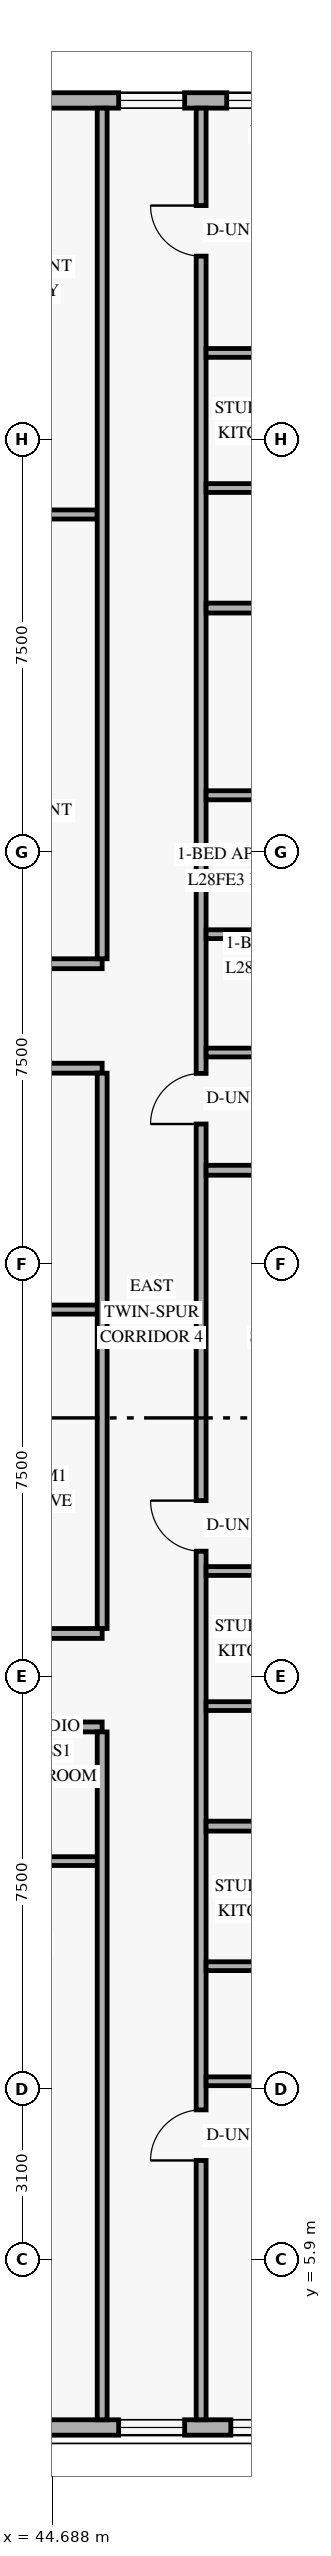
"""IFC4 building model, lengths in metres.
Left out: names, types, materials, properties, quantities, classifications, styles, units other than length and angle.
Written with IfcOpenShell. Run it as: python <this file> out.ifc"""

import sys

from ifc_helpers import new_model, si_unit, direction, frame, frame_2d, origin, place, context, subcontext, project, spatial, rectangle, extrude, element, fill, save


model = new_model("IFC4")
c1 = context("Model", 3, precision=1e-05, world=origin(), true_north=direction((0.0, 1.0)))
c2 = subcontext(c1, "Body", "Model", "MODEL_VIEW")
j1 = project(units=[si_unit("LENGTHUNIT", "METRE"), si_unit("PLANEANGLEUNIT", "RADIAN")], contexts=[c1])
p1 = place(None, origin())
s1 = spatial("IfcSite", under=j1, at=p1, CompositionType="ELEMENT")
p2 = place(p1, origin())
s2 = spatial("IfcBuilding", under=s1, at=p2, CompositionType="ELEMENT")
p3 = place(p2, frame((0.0, 0.0, 109.8)))
s3 = spatial("IfcBuildingStorey", under=s2, at=p3, CompositionType="ELEMENT", Elevation=109.8)
p4 = place(p3, frame((34.4, 2.84, 0.0), z_axis=(0.0, 0.0, 1.0), x_axis=(1.0, 0.0, 0.0)))
e1 = element("IfcWall", 1, at=p4, inside=s3, PredefinedType="SOLIDWALL", context=c2, shape_type="SweptSolid", body=[
    extrude(rectangle(XDim=15.58, YDim=0.28, at=frame_2d((7.79, 0.0))), origin(), (0.0, 0.0, 1.0), 3.36),
])
p5 = place(p4, frame((1.535, 0.0, 0.85)))
e2 = element("IfcOpeningElement", 2, at=p5, cuts=e1, PredefinedType="OPENING", context=c2, shape_type="SweptSolid", body=[
    extrude(rectangle(XDim=1.5, YDim=1.55, at=frame_2d((0.75, 0.775))), frame((0.0, 0.15, 0.0), z_axis=(0.0, -1.0, 0.0), x_axis=(1.0, 0.0, 0.0)), (0.0, 0.0, 1.0), 0.3),
])
p6 = place(p4, frame((6.625, 0.0, 0.85)))
e3 = element("IfcOpeningElement", 3, at=p6, cuts=e1, PredefinedType="OPENING", context=c2, shape_type="SweptSolid", body=[
    extrude(rectangle(XDim=1.5, YDim=1.55, at=frame_2d((0.75, 0.775))), frame((0.0, 0.15, 0.0), z_axis=(0.0, -1.0, 0.0), x_axis=(1.0, 0.0, 0.0)), (0.0, 0.0, 1.0), 0.3),
])
p7 = place(p4, frame((11.5, 0.0, 0.85)))
e4 = element("IfcOpeningElement", 4, at=p7, cuts=e1, PredefinedType="OPENING", context=c2, shape_type="SweptSolid", body=[
    extrude(rectangle(XDim=1.2, YDim=1.5, at=frame_2d((0.6, 0.75))), frame((0.0, 0.15, 0.0), z_axis=(0.0, -1.0, 0.0), x_axis=(1.0, 0.0, 0.0)), (0.0, 0.0, 1.0), 0.3),
])
p8 = place(p4, frame((13.54, 0.0, 0.85)))
e5 = element("IfcOpeningElement", 5, at=p8, cuts=e1, PredefinedType="OPENING", context=c2, shape_type="SweptSolid", body=[
    extrude(rectangle(XDim=1.5, YDim=1.55, at=frame_2d((0.75, 0.775))), frame((0.0, 0.15, 0.0), z_axis=(0.0, -1.0, 0.0), x_axis=(1.0, 0.0, 0.0)), (0.0, 0.0, 1.0), 0.3),
])
p9 = place(p3, frame((49.98, 45.16, 0.0), z_axis=(0.0, 0.0, 1.0), x_axis=(-1.0, 0.0, 0.0)))
e6 = element("IfcWall", 6, at=p9, inside=s3, PredefinedType="SOLIDWALL", context=c2, shape_type="SweptSolid", body=[
    extrude(rectangle(XDim=36.56, YDim=0.28, at=frame_2d((18.28, 0.0))), origin(), (0.0, 0.0, 1.0), 3.36),
])
p10 = place(p9, frame((30.99, 0.0, 0.85)))
e7 = element("IfcOpeningElement", 7, at=p10, cuts=e6, PredefinedType="OPENING", context=c2, shape_type="SweptSolid", body=[
    extrude(rectangle(XDim=1.65, YDim=1.6, at=frame_2d((0.825, 0.8))), frame((0.0, 0.15, 0.0), z_axis=(0.0, -1.0, 0.0), x_axis=(1.0, 0.0, 0.0)), (0.0, 0.0, 1.0), 0.3),
])
p11 = place(p9, frame((23.13, 0.0, 0.85)))
e8 = element("IfcOpeningElement", 8, at=p11, cuts=e6, PredefinedType="OPENING", context=c2, shape_type="SweptSolid", body=[
    extrude(rectangle(XDim=1.65, YDim=1.6, at=frame_2d((0.825, 0.8))), frame((0.0, 0.15, 0.0), z_axis=(0.0, -1.0, 0.0), x_axis=(1.0, 0.0, 0.0)), (0.0, 0.0, 1.0), 0.3),
])
p12 = place(p9, frame((16.245, 0.0, 0.85)))
e9 = element("IfcOpeningElement", 9, at=p12, cuts=e6, PredefinedType="OPENING", context=c2, shape_type="SweptSolid", body=[
    extrude(rectangle(XDim=1.65, YDim=1.6, at=frame_2d((0.825, 0.8))), frame((0.0, 0.15, 0.0), z_axis=(0.0, -1.0, 0.0), x_axis=(1.0, 0.0, 0.0)), (0.0, 0.0, 1.0), 0.3),
])
p13 = place(p9, frame((10.64, 0.0, 0.85)))
e10 = element("IfcOpeningElement", 10, at=p13, cuts=e6, PredefinedType="OPENING", context=c2, shape_type="SweptSolid", body=[
    extrude(rectangle(XDim=1.65, YDim=1.6, at=frame_2d((0.825, 0.8))), frame((0.0, 0.15, 0.0), z_axis=(0.0, -1.0, 0.0), x_axis=(1.0, 0.0, 0.0)), (0.0, 0.0, 1.0), 0.3),
])
p14 = place(p9, frame((5.55, 0.0, 0.85)))
e11 = element("IfcOpeningElement", 11, at=p14, cuts=e6, PredefinedType="OPENING", context=c2, shape_type="SweptSolid", body=[
    extrude(rectangle(XDim=1.65, YDim=1.6, at=frame_2d((0.825, 0.8))), frame((0.0, 0.15, 0.0), z_axis=(0.0, -1.0, 0.0), x_axis=(1.0, 0.0, 0.0)), (0.0, 0.0, 1.0), 0.3),
])
p15 = place(p9, frame((2.88, 0.0, 0.85)))
e12 = element("IfcOpeningElement", 12, at=p15, cuts=e6, PredefinedType="OPENING", context=c2, shape_type="SweptSolid", body=[
    extrude(rectangle(XDim=1.2, YDim=1.5, at=frame_2d((0.6, 0.75))), frame((0.0, 0.15, 0.0), z_axis=(0.0, -1.0, 0.0), x_axis=(1.0, 0.0, 0.0)), (0.0, 0.0, 1.0), 0.3),
])
p16 = place(p9, frame((0.465, 0.0, 0.85)))
e13 = element("IfcOpeningElement", 13, at=p16, cuts=e6, PredefinedType="OPENING", context=c2, shape_type="SweptSolid", body=[
    extrude(rectangle(XDim=1.65, YDim=1.6, at=frame_2d((0.825, 0.8))), frame((0.0, 0.15, 0.0), z_axis=(0.0, -1.0, 0.0), x_axis=(1.0, 0.0, 0.0)), (0.0, 0.0, 1.0), 0.3),
])
p17 = place(p3, frame((38.032, 15.58, 0.0), z_axis=(0.0, 0.0, 1.0), x_axis=(1.0, 0.0, 0.0)))
e14 = element("IfcWall", 14, at=p17, inside=s3, PredefinedType="STANDARD", context=c2, shape_type="SweptSolid", body=[
    extrude(rectangle(XDim=7.568, YDim=0.18, at=frame_2d((3.784, 0.0))), origin(), (0.0, 0.0, 1.0), 2.731),
])
p18 = place(p17, frame((0.357, 0.0, 0.0)))
e15 = element("IfcOpeningElement", 15, at=p18, cuts=e14, PredefinedType="OPENING", context=c2, shape_type="SweptSolid", body=[
    extrude(rectangle(XDim=0.92, YDim=2.15, at=frame_2d((0.46, 1.075))), frame((0.0, 0.1, 0.0), z_axis=(0.0, -1.0, 0.0), x_axis=(1.0, 0.0, 0.0)), (0.0, 0.0, 1.0), 0.2),
])
for number, where, z_axis, x_axis in (
    (16, (37.64, 17.28, 0.0), (0.0, 0.0, 1.0), (1.0, 0.0, 0.0)),
    (17, (37.64, 27.56, 0.0), (0.0, 0.0, 1.0), (1.0, 0.0, 0.0)),
):
    element("IfcWall", number, at=place(p3, frame(where, z_axis=z_axis, x_axis=x_axis)), inside=s3, PredefinedType="STANDARD", context=c2, shape_type="SweptSolid", body=[
        extrude(rectangle(XDim=7.96, YDim=0.18, at=frame_2d((3.98, 0.0))), origin(), (0.0, 0.0, 1.0), 2.731),
    ])
p19 = place(p3, frame((35.51, 29.46, 0.0), z_axis=(0.0, 0.0, 1.0), x_axis=(1.0, 0.0, 0.0)))
e18 = element("IfcWall", 18, at=p19, inside=s3, PredefinedType="STANDARD", context=c2, shape_type="SweptSolid", body=[
    extrude(rectangle(XDim=10.09, YDim=0.18, at=frame_2d((5.045, 0.0))), origin(), (0.0, 0.0, 1.0), 2.731),
])
p20 = place(p19, frame((0.32, 0.0, 0.0)))
e19 = element("IfcOpeningElement", 19, at=p20, cuts=e18, PredefinedType="OPENING", context=c2, shape_type="SweptSolid", body=[
    extrude(rectangle(XDim=0.92, YDim=2.15, at=frame_2d((0.46, 1.075))), frame((0.0, 0.1, 0.0), z_axis=(0.0, -1.0, 0.0), x_axis=(1.0, 0.0, 0.0)), (0.0, 0.0, 1.0), 0.2),
])
p21 = place(p3, frame((40.93, 13.14, 0.0), z_axis=(0.0, 0.0, 1.0), x_axis=(1.0, 0.0, 0.0)))
e20 = element("IfcWall", 20, at=p21, inside=s3, PredefinedType="PLUMBINGWALL", context=c2, shape_type="SweptSolid", body=[
    extrude(rectangle(XDim=4.67, YDim=0.16, at=frame_2d((2.335, 0.0))), origin(), (0.0, 0.0, 1.0), 2.731),
])
p22 = place(p21, frame((0.35, 0.0, 0.0)))
e21 = element("IfcOpeningElement", 21, at=p22, cuts=e20, PredefinedType="OPENING", context=c2, shape_type="SweptSolid", body=[
    extrude(rectangle(XDim=0.88, YDim=2.12, at=frame_2d((0.44, 1.06))), frame((0.0, 0.09, 0.0), z_axis=(0.0, -1.0, 0.0), x_axis=(1.0, 0.0, 0.0)), (0.0, 0.0, 1.0), 0.18),
])
p23 = place(p21, frame((2.72, 0.0, 0.0)))
e22 = element("IfcOpeningElement", 22, at=p23, cuts=e20, PredefinedType="OPENING", context=c2, shape_type="SweptSolid", body=[
    extrude(rectangle(XDim=0.86, YDim=2.12, at=frame_2d((0.43, 1.06))), frame((0.0, 0.09, 0.0), z_axis=(0.0, -1.0, 0.0), x_axis=(1.0, 0.0, 0.0)), (0.0, 0.0, 1.0), 0.18),
])
p24 = place(p3, frame((41.69, 37.63, 0.0), z_axis=(0.0, 0.0, 1.0), x_axis=(1.0, 0.0, 0.0)))
e23 = element("IfcWall", 23, at=p24, inside=s3, PredefinedType="PARTITIONING", context=c2, shape_type="SweptSolid", body=[
    extrude(rectangle(XDim=3.82, YDim=0.165, at=frame_2d((1.91, 0.0))), origin(), (0.0, 0.0, 1.0), 2.731),
])
p25 = place(p3, frame((42.038, 23.17, 0.0), z_axis=(0.0, 0.0, 1.0), x_axis=(1.0, 0.0, 0.0)))
e24 = element("IfcWall", 24, at=p25, inside=s3, PredefinedType="PARTITIONING", context=c2, shape_type="SweptSolid", body=[
    extrude(rectangle(XDim=3.922, YDim=0.165, at=frame_2d((1.961, 0.0))), origin(), (0.0, 0.0, 1.0), 2.731),
])
p26 = place(p25, frame((0.55, 0.0, 0.0)))
e25 = element("IfcOpeningElement", 25, at=p26, cuts=e24, PredefinedType="OPENING", context=c2, shape_type="SweptSolid", body=[
    extrude(rectangle(XDim=0.88, YDim=2.12, at=frame_2d((0.44, 1.06))), frame((0.0, 0.093, 0.0), z_axis=(0.0, -1.0, 0.0), x_axis=(1.0, 0.0, 0.0)), (0.0, 0.0, 1.0), 0.185),
])
p27 = place(p3, frame((47.4, 2.98, 0.0), z_axis=(0.0, 0.0, 1.0), x_axis=(0.0, 1.0, 0.0)))
e26 = element("IfcWall", 26, at=p27, inside=s3, PredefinedType="STANDARD", context=c2, shape_type="SweptSolid", body=[
    extrude(rectangle(XDim=42.04, YDim=0.18, at=frame_2d((21.02, 0.0))), origin(), (0.0, 0.0, 1.0), 2.731),
])
p28 = place(p27, frame((4.716, 0.0, 0.0)))
e27 = element("IfcOpeningElement", 27, at=p28, cuts=e26, PredefinedType="OPENING", context=c2, shape_type="SweptSolid", body=[
    extrude(rectangle(XDim=0.92, YDim=2.15, at=frame_2d((0.46, 1.075))), frame((0.0, 0.1, 0.0), z_axis=(0.0, -1.0, 0.0), x_axis=(1.0, 0.0, 0.0)), (0.0, 0.0, 1.0), 0.2),
])
p29 = place(p27, frame((15.796, 0.0, 0.0)))
e28 = element("IfcOpeningElement", 28, at=p29, cuts=e26, PredefinedType="OPENING", context=c2, shape_type="SweptSolid", body=[
    extrude(rectangle(XDim=0.92, YDim=2.15, at=frame_2d((0.46, 1.075))), frame((0.0, 0.1, 0.0), z_axis=(0.0, -1.0, 0.0), x_axis=(1.0, 0.0, 0.0)), (0.0, 0.0, 1.0), 0.2),
])
p30 = place(p27, frame((23.565, 0.0, 0.0)))
e29 = element("IfcOpeningElement", 29, at=p30, cuts=e26, PredefinedType="OPENING", context=c2, shape_type="SweptSolid", body=[
    extrude(rectangle(XDim=0.92, YDim=2.15, at=frame_2d((0.46, 1.075))), frame((0.0, 0.1, 0.0), z_axis=(0.0, -1.0, 0.0), x_axis=(1.0, 0.0, 0.0)), (0.0, 0.0, 1.0), 0.2),
])
p31 = place(p27, frame((39.348, 0.0, 0.0)))
e30 = element("IfcOpeningElement", 30, at=p31, cuts=e26, PredefinedType="OPENING", context=c2, shape_type="SweptSolid", body=[
    extrude(rectangle(XDim=0.92, YDim=2.15, at=frame_2d((0.46, 1.075))), frame((0.0, 0.1, 0.0), z_axis=(0.0, -1.0, 0.0), x_axis=(1.0, 0.0, 0.0)), (0.0, 0.0, 1.0), 0.2),
])
p32 = place(p3, frame((45.6, 2.98, 0.0), z_axis=(0.0, 0.0, 1.0), x_axis=(0.0, 1.0, 0.0)))
e31 = element("IfcWall", 31, at=p32, inside=s3, PredefinedType="STANDARD", context=c2, shape_type="SweptSolid", body=[
    extrude(rectangle(XDim=12.51, YDim=0.18, at=frame_2d((6.255, 0.0))), origin(), (0.0, 0.0, 1.0), 2.731),
])
p33 = place(p3, frame((45.6, 17.37, 0.0), z_axis=(0.0, 0.0, 1.0), x_axis=(0.0, 1.0, 0.0)))
e32 = element("IfcWall", 32, at=p33, inside=s3, PredefinedType="STANDARD", context=c2, shape_type="SweptSolid", body=[
    extrude(rectangle(XDim=10.1, YDim=0.18, at=frame_2d((5.05, 0.0))), origin(), (0.0, 0.0, 1.0), 2.731),
])
p34 = place(p3, frame((45.6, 29.55, 0.0), z_axis=(0.0, 0.0, 1.0), x_axis=(0.0, 1.0, 0.0)))
e33 = element("IfcWall", 33, at=p34, inside=s3, PredefinedType="STANDARD", context=c2, shape_type="SweptSolid", body=[
    extrude(rectangle(XDim=15.47, YDim=0.18, at=frame_2d((7.735, 0.0))), origin(), (0.0, 0.0, 1.0), 2.731),
])
p35 = place(p3, frame((47.49, 9.136, 0.0), z_axis=(0.0, 0.0, 1.0), x_axis=(1.0, 0.0, 0.0)))
e34 = element("IfcWall", 34, at=p35, inside=s3, PredefinedType="PLUMBINGWALL", context=c2, shape_type="SweptSolid", body=[
    extrude(rectangle(XDim=3.775, YDim=0.16, at=frame_2d((1.888, 0.0))), origin(), (0.0, 0.0, 1.0), 2.731),
])
p36 = place(p3, frame((47.49, 11.229, 0.0), z_axis=(0.0, 0.0, 1.0), x_axis=(1.0, 0.0, 0.0)))
e35 = element("IfcWall", 35, at=p36, inside=s3, PredefinedType="PLUMBINGWALL", context=c2, shape_type="SweptSolid", body=[
    extrude(rectangle(XDim=3.615, YDim=0.16, at=frame_2d((1.808, 0.0))), origin(), (0.0, 0.0, 1.0), 2.809),
])
p37 = place(p3, frame((47.49, 13.776, 0.0), z_axis=(0.0, 0.0, 1.0), x_axis=(1.0, 0.0, 0.0)))
e36 = element("IfcWall", 36, at=p37, inside=s3, PredefinedType="PARTITIONING", context=c2, shape_type="SweptSolid", body=[
    extrude(rectangle(XDim=5.83, YDim=0.18, at=frame_2d((2.915, 0.0))), origin(), (0.0, 0.0, 1.0), 2.809),
])
p38 = place(p3, frame((47.49, 18.416, 0.0), z_axis=(0.0, 0.0, 1.0), x_axis=(1.0, 0.0, 0.0)))
e37 = element("IfcWall", 37, at=p38, inside=s3, PredefinedType="PLUMBINGWALL", context=c2, shape_type="SweptSolid", body=[
    extrude(rectangle(XDim=3.775, YDim=0.16, at=frame_2d((1.888, 0.0))), origin(), (0.0, 0.0, 1.0), 2.809),
])
p39 = place(p3, frame((47.49, 15.959, 0.0), z_axis=(0.0, 0.0, 1.0), x_axis=(1.0, 0.0, 0.0)))
e38 = element("IfcWall", 38, at=p39, inside=s3, PredefinedType="PLUMBINGWALL", context=c2, shape_type="SweptSolid", body=[
    extrude(rectangle(XDim=3.615, YDim=0.16, at=frame_2d((1.808, 0.0))), origin(), (0.0, 0.0, 1.0), 2.809),
])
p40 = place(p3, frame((47.49, 25.704, 0.0), z_axis=(0.0, 0.0, 1.0), x_axis=(1.0, 0.0, 0.0)))
e39 = element("IfcWall", 39, at=p40, inside=s3, PredefinedType="PARTITIONING", context=c2, shape_type="SweptSolid", body=[
    extrude(rectangle(XDim=5.83, YDim=0.18, at=frame_2d((2.915, 0.0))), origin(), (0.0, 0.0, 1.0), 2.809),
])
p41 = place(p3, frame((47.49, 32.523, 0.0), z_axis=(0.0, 0.0, 1.0), x_axis=(1.0, 0.0, 0.0)))
e40 = element("IfcWall", 40, at=p41, inside=s3, PredefinedType="PARTITIONING", context=c2, shape_type="SweptSolid", body=[
    extrude(rectangle(XDim=5.83, YDim=0.165, at=frame_2d((2.915, 0.0))), origin(), (0.0, 0.0, 1.0), 2.809),
])
p42 = place(p41, frame((4.468, 0.0, 0.0)))
e41 = element("IfcOpeningElement", 41, at=p42, cuts=e40, PredefinedType="OPENING", context=c2, shape_type="SweptSolid", body=[
    extrude(rectangle(XDim=0.9, YDim=2.14, at=frame_2d((0.45, 1.07))), frame((0.0, 0.093, 0.0), z_axis=(0.0, -1.0, 0.0), x_axis=(1.0, 0.0, 0.0)), (0.0, 0.0, 1.0), 0.185),
])
p43 = place(p3, frame((47.49, 27.845, 0.0), z_axis=(0.0, 0.0, 1.0), x_axis=(1.0, 0.0, 0.0)))
e42 = element("IfcWall", 42, at=p43, inside=s3, PredefinedType="PLUMBINGWALL", context=c2, shape_type="SweptSolid", body=[
    extrude(rectangle(XDim=3.775, YDim=0.16, at=frame_2d((1.888, 0.0))), origin(), (0.0, 0.0, 1.0), 2.809),
])
p44 = place(p3, frame((47.49, 29.997, 0.0), z_axis=(0.0, 0.0, 1.0), x_axis=(1.0, 0.0, 0.0)))
e43 = element("IfcWall", 43, at=p44, inside=s3, PredefinedType="PLUMBINGWALL", context=c2, shape_type="SweptSolid", body=[
    extrude(rectangle(XDim=3.615, YDim=0.16, at=frame_2d((1.808, 0.0))), origin(), (0.0, 0.0, 1.0), 2.731),
])
p45 = place(p3, frame((47.49, 35.928, 0.0), z_axis=(0.0, 0.0, 1.0), x_axis=(1.0, 0.0, 0.0)))
e44 = element("IfcWall", 44, at=p45, inside=s3, PredefinedType="PARTITIONING", context=c2, shape_type="SweptSolid", body=[
    extrude(rectangle(XDim=5.83, YDim=0.18, at=frame_2d((2.915, 0.0))), origin(), (0.0, 0.0, 1.0), 2.809),
])
p46 = place(p3, frame((47.49, 40.568, 0.0), z_axis=(0.0, 0.0, 1.0), x_axis=(1.0, 0.0, 0.0)))
e45 = element("IfcWall", 45, at=p46, inside=s3, PredefinedType="PLUMBINGWALL", context=c2, shape_type="SweptSolid", body=[
    extrude(rectangle(XDim=3.775, YDim=0.16, at=frame_2d((1.888, 0.0))), origin(), (0.0, 0.0, 1.0), 2.809),
])
p47 = place(p3, frame((47.49, 38.111, 0.0), z_axis=(0.0, 0.0, 1.0), x_axis=(1.0, 0.0, 0.0)))
e46 = element("IfcWall", 46, at=p47, inside=s3, PredefinedType="PLUMBINGWALL", context=c2, shape_type="SweptSolid", body=[
    extrude(rectangle(XDim=3.615, YDim=0.16, at=frame_2d((1.808, 0.0))), origin(), (0.0, 0.0, 1.0), 2.809),
])
p48 = place(p7, origin())
e47 = element("IfcWindow", 47, at=p48, inside=s3, PartitioningType="SINGLE_PANEL", PredefinedType="WINDOW", context=c2, shape_type="SweptSolid", body=[
    extrude(rectangle(XDim=1.2, YDim=1.5, at=frame_2d((0.6, 0.75))), frame((0.0, 0.03, 0.0), z_axis=(0.0, -1.0, 0.0), x_axis=(1.0, 0.0, 0.0)), (0.0, 0.0, 1.0), 0.06),
])
fill(e4, e47)
p49 = place(p8, origin())
e48 = element("IfcWindow", 48, at=p49, inside=s3, PartitioningType="SINGLE_PANEL", PredefinedType="WINDOW", context=c2, shape_type="SweptSolid", body=[
    extrude(rectangle(XDim=1.5, YDim=1.55, at=frame_2d((0.75, 0.775))), frame((0.0, 0.03, 0.0), z_axis=(0.0, -1.0, 0.0), x_axis=(1.0, 0.0, 0.0)), (0.0, 0.0, 1.0), 0.06),
])
fill(e5, e48)
p50 = place(p15, origin())
e49 = element("IfcWindow", 49, at=p50, inside=s3, PartitioningType="SINGLE_PANEL", PredefinedType="WINDOW", context=c2, shape_type="SweptSolid", body=[
    extrude(rectangle(XDim=1.2, YDim=1.5, at=frame_2d((0.6, 0.75))), frame((0.0, 0.03, 0.0), z_axis=(0.0, -1.0, 0.0), x_axis=(1.0, 0.0, 0.0)), (0.0, 0.0, 1.0), 0.06),
])
fill(e12, e49)
p51 = place(p16, origin())
e50 = element("IfcWindow", 50, at=p51, inside=s3, PartitioningType="SINGLE_PANEL", PredefinedType="WINDOW", context=c2, shape_type="SweptSolid", body=[
    extrude(rectangle(XDim=1.65, YDim=1.6, at=frame_2d((0.825, 0.8))), frame((0.0, 0.03, 0.0), z_axis=(0.0, -1.0, 0.0), x_axis=(1.0, 0.0, 0.0)), (0.0, 0.0, 1.0), 0.06),
])
fill(e13, e50)
p52 = place(p28, origin())
e51 = element("IfcDoor", 51, at=p52, inside=s3, OperationType="SINGLE_SWING_LEFT", PredefinedType="DOOR", context=c2, shape_type="SweptSolid", body=[
    extrude(rectangle(XDim=0.92, YDim=2.15, at=frame_2d((0.46, 1.075))), frame((0.0, 0.025, 0.0), z_axis=(0.0, -1.0, 0.0), x_axis=(1.0, 0.0, 0.0)), (0.0, 0.0, 1.0), 0.05),
])
fill(e27, e51)
p53 = place(p29, origin())
e52 = element("IfcDoor", 52, at=p53, inside=s3, OperationType="SINGLE_SWING_RIGHT", PredefinedType="DOOR", context=c2, shape_type="SweptSolid", body=[
    extrude(rectangle(XDim=0.92, YDim=2.15, at=frame_2d((0.46, 1.075))), frame((0.0, 0.025, 0.0), z_axis=(0.0, -1.0, 0.0), x_axis=(1.0, 0.0, 0.0)), (0.0, 0.0, 1.0), 0.05),
])
fill(e28, e52)
p54 = place(p30, origin())
e53 = element("IfcDoor", 53, at=p54, inside=s3, OperationType="SINGLE_SWING_LEFT", PredefinedType="DOOR", context=c2, shape_type="SweptSolid", body=[
    extrude(rectangle(XDim=0.92, YDim=2.15, at=frame_2d((0.46, 1.075))), frame((0.0, 0.025, 0.0), z_axis=(0.0, -1.0, 0.0), x_axis=(1.0, 0.0, 0.0)), (0.0, 0.0, 1.0), 0.05),
])
fill(e29, e53)
p55 = place(p31, origin())
e54 = element("IfcDoor", 54, at=p55, inside=s3, OperationType="SINGLE_SWING_RIGHT", PredefinedType="DOOR", context=c2, shape_type="SweptSolid", body=[
    extrude(rectangle(XDim=0.92, YDim=2.15, at=frame_2d((0.46, 1.075))), frame((0.0, 0.025, 0.0), z_axis=(0.0, -1.0, 0.0), x_axis=(1.0, 0.0, 0.0)), (0.0, 0.0, 1.0), 0.05),
])
fill(e30, e54)
save(model, sys.argv[1])
